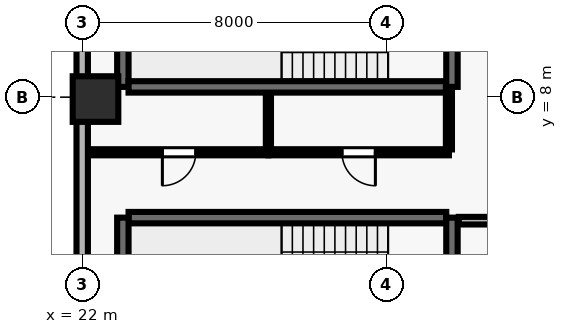
"""IFC4 building model, lengths in metres.
Left out: names, types, materials, properties, quantities, classifications, styles, units other than length and angle.
Written with IfcOpenShell. Run it as: python <this file> out.ifc"""

import sys

from ifc_helpers import new_model, si_unit, direction, frame, frame_2d, origin, origin_2d, place, context, subcontext, project, spatial, rectangle, extrude, element, fill, save


model = new_model("IFC4")
c1 = context("Model", 3, precision=1e-05, world=origin(), true_north=direction((0.0, 1.0)))
c2 = subcontext(c1, "Body", "Model", "MODEL_VIEW")
j1 = project(units=[si_unit("LENGTHUNIT", "METRE"), si_unit("PLANEANGLEUNIT", "RADIAN")], contexts=[c1])
p1 = place(None, origin())
s1 = spatial("IfcSite", under=j1, at=p1, CompositionType="ELEMENT")
p2 = place(p1, origin())
s2 = spatial("IfcBuilding", under=s1, at=p2, CompositionType="ELEMENT")
p3 = place(p2, frame((0.0, 0.0, 107.3)))
s3 = spatial("IfcBuildingStorey", under=s2, at=p3, CompositionType="ELEMENT", Elevation=107.3)
p4 = place(p3, frame((22.35, 7.95, 0.0), z_axis=(0.0, 0.0, 1.0), x_axis=(1.0, 0.0, 0.0)))
e1 = element("IfcColumn", 1, at=p4, inside=s3, PredefinedType="COLUMN", context=c2, shape_type="SweptSolid", body=[
    extrude(rectangle(XDim=1.2, YDim=1.2, at=origin_2d()), origin(), (0.0, 0.0, 1.0), 3.9),
])
p5 = place(p3, frame((22.0, 46.1, 0.0), z_axis=(0.0, 0.0, 1.0), x_axis=(0.0, -1.0, 0.0)))
e2 = element("IfcWall", 2, at=p5, inside=s3, PredefinedType="SOLIDWALL", context=c2, shape_type="SweptSolid", body=[
    extrude(rectangle(XDim=43.6, YDim=0.3, at=frame_2d((21.8, 0.0))), origin(), (0.0, 0.0, 1.0), 3.69),
])
p6 = place(p5, frame((7.1, 0.0, 0.0)))
e3 = element("IfcOpeningElement", 3, at=p6, cuts=e2, PredefinedType="OPENING", context=c2, shape_type="SweptSolid", body=[
    extrude(rectangle(XDim=1.0, YDim=2.2, at=frame_2d((0.5, 1.1))), frame((0.0, 0.16, 0.0), z_axis=(0.0, -1.0, 0.0), x_axis=(1.0, 0.0, 0.0)), (0.0, 0.0, 1.0), 0.32),
])
p7 = place(p5, frame((1.975, 0.0, 0.9)))
e4 = element("IfcOpeningElement", 4, at=p7, cuts=e2, PredefinedType="OPENING", context=c2, shape_type="SweptSolid", body=[
    extrude(rectangle(XDim=1.5, YDim=1.6, at=frame_2d((0.75, 0.8))), frame((0.0, 0.16, 0.0), z_axis=(0.0, -1.0, 0.0), x_axis=(1.0, 0.0, 0.0)), (0.0, 0.0, 1.0), 0.32),
])
p8 = place(p5, frame((13.325, 0.0, 0.9)))
e5 = element("IfcOpeningElement", 5, at=p8, cuts=e2, PredefinedType="OPENING", context=c2, shape_type="SweptSolid", body=[
    extrude(rectangle(XDim=1.5, YDim=1.6, at=frame_2d((0.75, 0.8))), frame((0.0, 0.16, 0.0), z_axis=(0.0, -1.0, 0.0), x_axis=(1.0, 0.0, 0.0)), (0.0, 0.0, 1.0), 0.32),
])
p9 = place(p5, frame((17.875, 0.0, 0.9)))
e6 = element("IfcOpeningElement", 6, at=p9, cuts=e2, PredefinedType="OPENING", context=c2, shape_type="SweptSolid", body=[
    extrude(rectangle(XDim=1.5, YDim=1.6, at=frame_2d((0.75, 0.8))), frame((0.0, 0.16, 0.0), z_axis=(0.0, -1.0, 0.0), x_axis=(1.0, 0.0, 0.0)), (0.0, 0.0, 1.0), 0.32),
])
p10 = place(p5, frame((23.775, 0.0, 0.9)))
e7 = element("IfcOpeningElement", 7, at=p10, cuts=e2, PredefinedType="OPENING", context=c2, shape_type="SweptSolid", body=[
    extrude(rectangle(XDim=1.5, YDim=1.6, at=frame_2d((0.75, 0.8))), frame((0.0, 0.16, 0.0), z_axis=(0.0, -1.0, 0.0), x_axis=(1.0, 0.0, 0.0)), (0.0, 0.0, 1.0), 0.32),
])
p11 = place(p5, frame((28.775, 0.0, 0.9)))
e8 = element("IfcOpeningElement", 8, at=p11, cuts=e2, PredefinedType="OPENING", context=c2, shape_type="SweptSolid", body=[
    extrude(rectangle(XDim=1.5, YDim=1.6, at=frame_2d((0.75, 0.8))), frame((0.0, 0.16, 0.0), z_axis=(0.0, -1.0, 0.0), x_axis=(1.0, 0.0, 0.0)), (0.0, 0.0, 1.0), 0.32),
])
p12 = place(p5, frame((34.675, 0.0, 0.9)))
e9 = element("IfcOpeningElement", 9, at=p12, cuts=e2, PredefinedType="OPENING", context=c2, shape_type="SweptSolid", body=[
    extrude(rectangle(XDim=1.5, YDim=1.6, at=frame_2d((0.75, 0.8))), frame((0.0, 0.16, 0.0), z_axis=(0.0, -1.0, 0.0), x_axis=(1.0, 0.0, 0.0)), (0.0, 0.0, 1.0), 0.32),
])
p13 = place(p3, frame((31.58, 4.83, 0.0), z_axis=(0.0, 0.0, 1.0), x_axis=(-1.0, 0.0, 0.0)))
e10 = element("IfcWall", 10, at=p13, inside=s3, PredefinedType="SHEAR", context=c2, shape_type="SweptSolid", body=[
    extrude(rectangle(XDim=8.36, YDim=0.3, at=frame_2d((4.18, 0.0))), origin(), (0.0, 0.0, 1.0), 3.69),
])
p14 = place(p3, frame((23.07, 4.83, 0.0), z_axis=(0.0, 0.0, 1.0), x_axis=(0.0, -1.0, 0.0)))
e11 = element("IfcWall", 11, at=p14, inside=s3, PredefinedType="SHEAR", context=c2, shape_type="SweptSolid", body=[
    extrude(rectangle(XDim=3.51, YDim=0.3, at=frame_2d((1.755, 0.0))), origin(), (0.0, 0.0, 1.0), 3.69),
])
p15 = place(p3, frame((31.73, 0.96, 0.0), z_axis=(0.0, 0.0, 1.0), x_axis=(0.0, 1.0, 0.0)))
e12 = element("IfcWall", 12, at=p15, inside=s3, PredefinedType="SHEAR", context=c2, shape_type="SweptSolid", body=[
    extrude(rectangle(XDim=3.87, YDim=0.3, at=frame_2d((1.935, 0.0))), origin(), (0.0, 0.0, 1.0), 3.69),
])
p16 = place(p15, frame((1.54, 0.0, 0.0)))
e13 = element("IfcOpeningElement", 13, at=p16, cuts=e12, PredefinedType="OPENING", context=c2, shape_type="SweptSolid", body=[
    extrude(rectangle(XDim=1.15, YDim=2.15, at=frame_2d((0.575, 1.075))), frame((0.0, 0.16, 0.0), z_axis=(0.0, -1.0, 0.0), x_axis=(1.0, 0.0, 0.0)), (0.0, 0.0, 1.0), 0.32),
])
p17 = place(p3, frame((23.07, 11.78, 0.0), z_axis=(0.0, 0.0, 1.0), x_axis=(0.0, -1.0, 0.0)))
e14 = element("IfcWall", 14, at=p17, inside=s3, PredefinedType="SHEAR", context=c2, shape_type="SweptSolid", body=[
    extrude(rectangle(XDim=3.51, YDim=0.3, at=frame_2d((1.755, 0.0))), origin(), (0.0, 0.0, 1.0), 3.69),
])
p18 = place(p3, frame((23.22, 8.27, 0.0), z_axis=(0.0, 0.0, 1.0), x_axis=(1.0, 0.0, 0.0)))
e15 = element("IfcWall", 15, at=p18, inside=s3, PredefinedType="SHEAR", context=c2, shape_type="SweptSolid", body=[
    extrude(rectangle(XDim=8.36, YDim=0.3, at=frame_2d((4.18, 0.0))), origin(), (0.0, 0.0, 1.0), 3.69),
])
p19 = place(p3, frame((31.73, 8.27, 0.0), z_axis=(0.0, 0.0, 1.0), x_axis=(0.0, 1.0, 0.0)))
e16 = element("IfcWall", 16, at=p19, inside=s3, PredefinedType="SHEAR", context=c2, shape_type="SweptSolid", body=[
    extrude(rectangle(XDim=3.51, YDim=0.3, at=frame_2d((1.755, 0.0))), origin(), (0.0, 0.0, 1.0), 3.69),
])
p20 = place(p19, frame((1.18, 0.0, 0.0)))
e17 = element("IfcOpeningElement", 17, at=p20, cuts=e16, PredefinedType="OPENING", context=c2, shape_type="SweptSolid", body=[
    extrude(rectangle(XDim=1.15, YDim=2.15, at=frame_2d((0.575, 1.075))), frame((0.0, 0.16, 0.0), z_axis=(0.0, -1.0, 0.0), x_axis=(1.0, 0.0, 0.0)), (0.0, 0.0, 1.0), 0.32),
])
p21 = place(p3, frame((26.9, 6.55, 0.0), z_axis=(0.0, 0.0, 1.0), x_axis=(-1.0, 0.0, 0.0)))
e18 = element("IfcWall", 18, at=p21, inside=s3, PredefinedType="PARTITIONING", context=c2, shape_type="SweptSolid", body=[
    extrude(rectangle(XDim=4.7, YDim=0.16, at=frame_2d((2.35, 0.0))), origin(), (0.0, 0.0, 1.0), 3.69),
])
p22 = place(p21, frame((1.91, 0.0, 0.0)))
e19 = element("IfcOpeningElement", 19, at=p22, cuts=e18, PredefinedType="OPENING", context=c2, shape_type="SweptSolid", body=[
    extrude(rectangle(XDim=0.88, YDim=2.1, at=frame_2d((0.44, 1.05))), frame((0.0, 0.09, 0.0), z_axis=(0.0, -1.0, 0.0), x_axis=(1.0, 0.0, 0.0)), (0.0, 0.0, 1.0), 0.18),
])
p23 = place(p3, frame((31.65, 6.55, 0.0), z_axis=(0.0, 0.0, 1.0), x_axis=(-1.0, 0.0, 0.0)))
e20 = element("IfcWall", 20, at=p23, inside=s3, PredefinedType="PARTITIONING", context=c2, shape_type="SweptSolid", body=[
    extrude(rectangle(XDim=4.75, YDim=0.16, at=frame_2d((2.375, 0.0))), origin(), (0.0, 0.0, 1.0), 3.69),
])
p24 = place(p23, frame((1.935, 0.0, 0.0)))
e21 = element("IfcOpeningElement", 21, at=p24, cuts=e20, PredefinedType="OPENING", context=c2, shape_type="SweptSolid", body=[
    extrude(rectangle(XDim=0.88, YDim=2.1, at=frame_2d((0.44, 1.05))), frame((0.0, 0.09, 0.0), z_axis=(0.0, -1.0, 0.0), x_axis=(1.0, 0.0, 0.0)), (0.0, 0.0, 1.0), 0.18),
])
p25 = place(p3, frame((35.02, 4.75, 0.0), z_axis=(0.0, 0.0, 1.0), x_axis=(-1.0, 0.0, 0.0)))
e22 = element("IfcWall", 22, at=p25, inside=s3, PredefinedType="SOLIDWALL", context=c2, shape_type="SweptSolid", body=[
    extrude(rectangle(XDim=3.11, YDim=0.2, at=frame_2d((1.555, 0.0))), origin(), (0.0, 0.0, 1.0), 3.69),
])
p26 = place(p25, frame((1.03, 0.0, 0.0)))
e23 = element("IfcOpeningElement", 23, at=p26, cuts=e22, PredefinedType="OPENING", context=c2, shape_type="SweptSolid", body=[
    extrude(rectangle(XDim=1.05, YDim=2.15, at=frame_2d((0.525, 1.075))), frame((0.0, 0.11, 0.0), z_axis=(0.0, -1.0, 0.0), x_axis=(1.0, 0.0, 0.0)), (0.0, 0.0, 1.0), 0.22),
])
p27 = place(p3, frame((26.9, 6.625, 0.0), z_axis=(0.0, 0.0, 1.0), x_axis=(0.0, 1.0, 0.0)))
e24 = element("IfcWall", 24, at=p27, inside=s3, PredefinedType="PARTITIONING", context=c2, shape_type="SweptSolid", body=[
    extrude(rectangle(XDim=1.465, YDim=0.135, at=frame_2d((0.732, 0.0))), origin(), (0.0, 0.0, 1.0), 3.69),
])
p28 = place(p3, frame((31.65, 8.24, 0.0), z_axis=(0.0, 0.0, 1.0), x_axis=(0.0, -1.0, 0.0)))
e25 = element("IfcWall", 25, at=p28, inside=s3, PredefinedType="PARTITIONING", context=c2, shape_type="SweptSolid", body=[
    extrude(rectangle(XDim=1.615, YDim=0.16, at=frame_2d((0.808, 0.0))), origin(), (0.0, 0.0, 1.0), 3.69),
])
p29 = place(p22, origin())
e26 = element("IfcDoor", 26, at=p29, inside=s3, OperationType="SINGLE_SWING_RIGHT", PredefinedType="DOOR", context=c2, shape_type="SweptSolid", body=[
    extrude(rectangle(XDim=0.88, YDim=2.1, at=frame_2d((0.44, 1.05))), frame((0.0, 0.025, 0.0), z_axis=(0.0, -1.0, 0.0), x_axis=(1.0, 0.0, 0.0)), (0.0, 0.0, 1.0), 0.05),
])
fill(e19, e26)
p30 = place(p24, origin())
e27 = element("IfcDoor", 27, at=p30, inside=s3, OperationType="SINGLE_SWING_LEFT", PredefinedType="DOOR", context=c2, shape_type="SweptSolid", body=[
    extrude(rectangle(XDim=0.88, YDim=2.1, at=frame_2d((0.44, 1.05))), frame((0.0, 0.025, 0.0), z_axis=(0.0, -1.0, 0.0), x_axis=(1.0, 0.0, 0.0)), (0.0, 0.0, 1.0), 0.05),
])
fill(e21, e27)
save(model, sys.argv[1])
